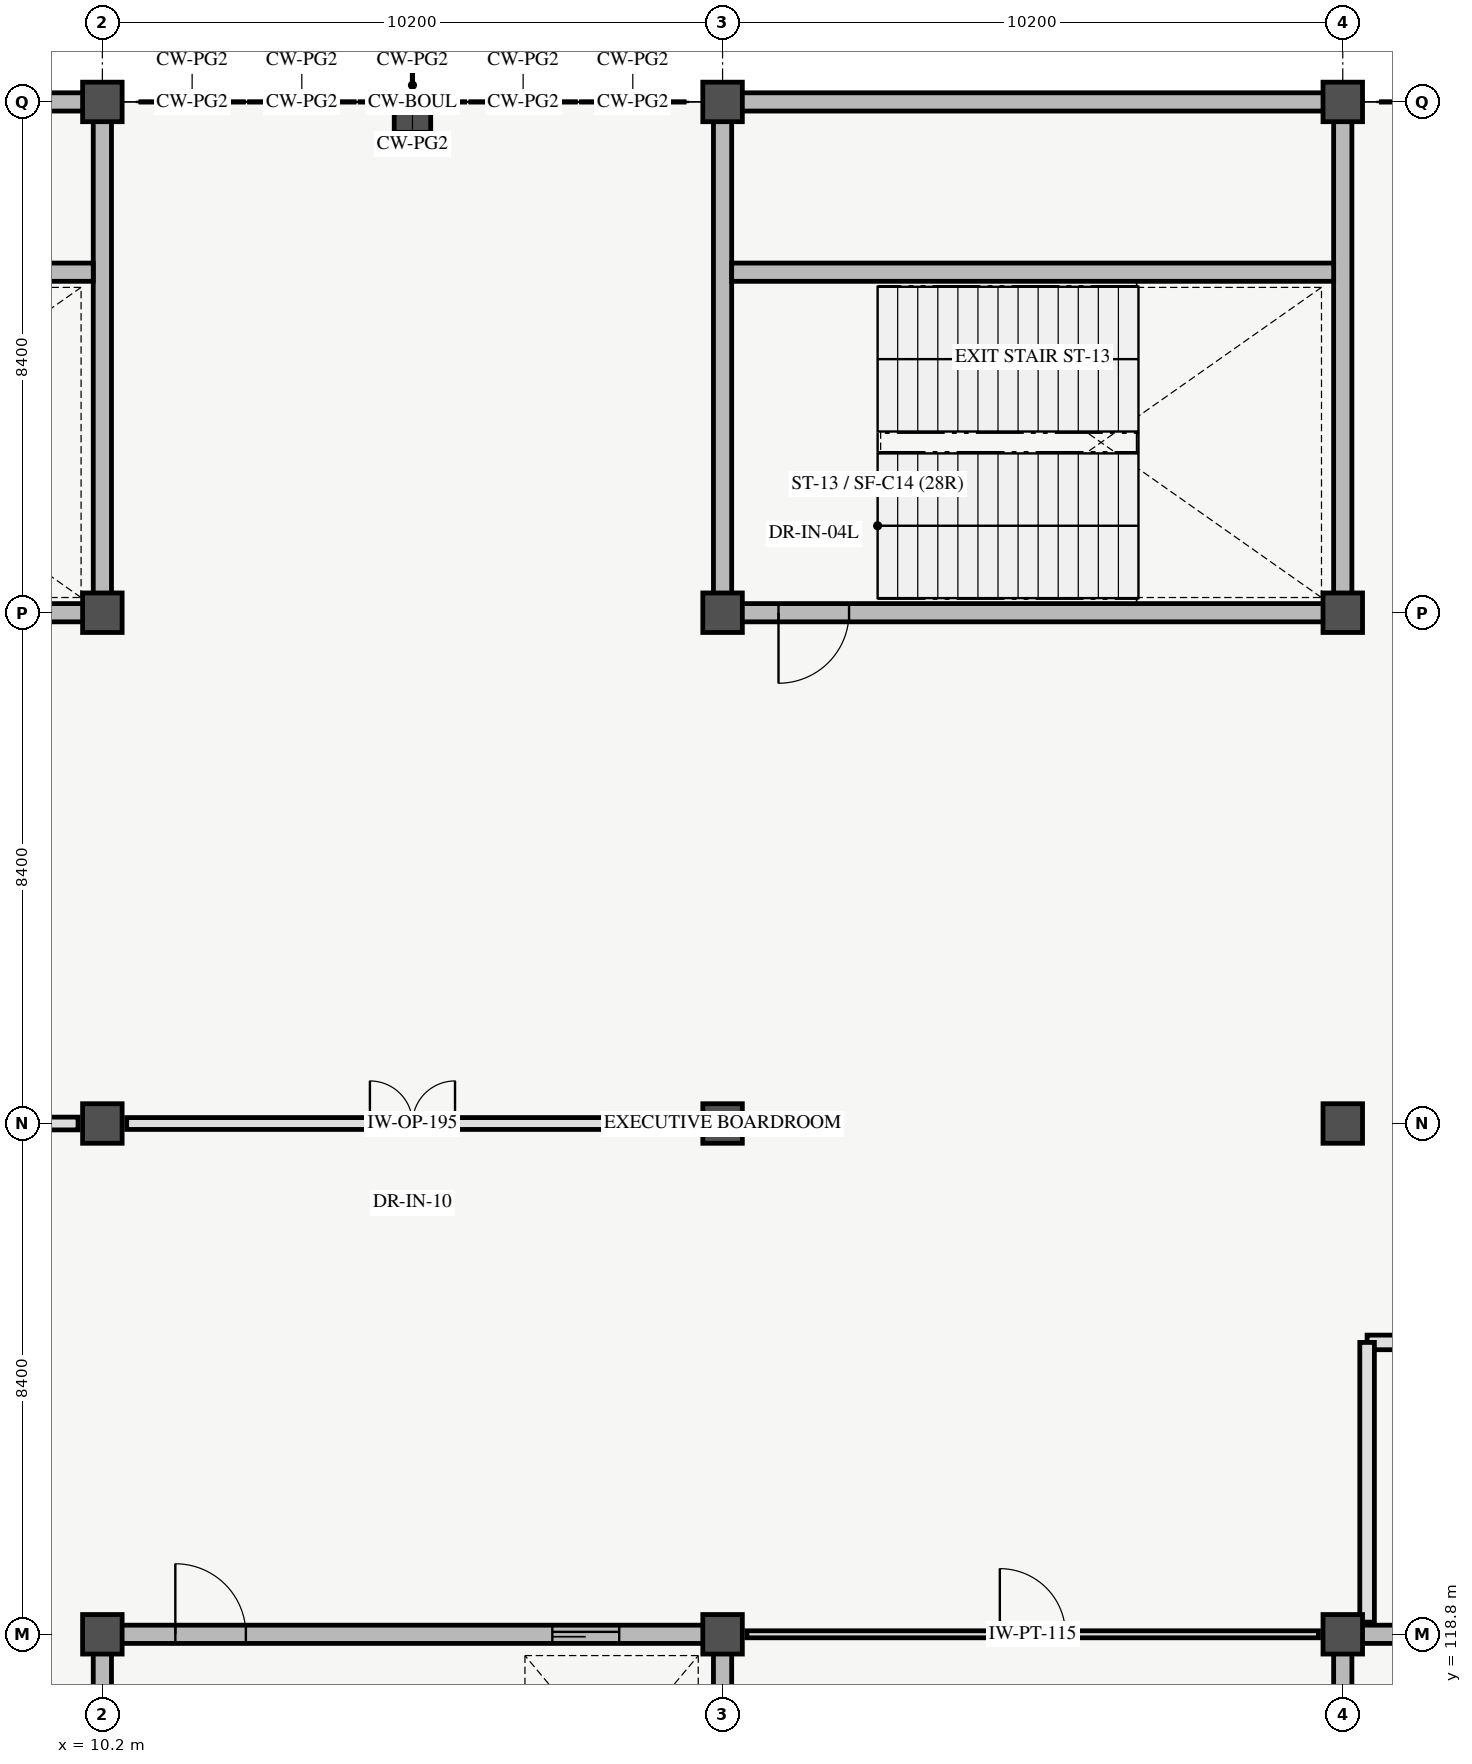
"""IFC4 building model, lengths in metres.
Left out: names, types, materials, properties, quantities, classifications, styles, units other than length and angle.
Written with IfcOpenShell. Run it as: python <this file> out.ifc"""

import sys

from ifc_helpers import new_model, si_unit, direction, frame, frame_2d, origin, origin_2d, place, context, subcontext, project, spatial, rectangle, extrude, element, fill, save


model = new_model("IFC4")
c1 = context("Model", 3, precision=1e-05, world=origin(), true_north=direction((0.0, 1.0)))
c2 = subcontext(c1, "Body", "Model", "MODEL_VIEW")
j1 = project(units=[si_unit("LENGTHUNIT", "METRE"), si_unit("PLANEANGLEUNIT", "RADIAN")], contexts=[c1])
p1 = place(None, origin())
s1 = spatial("IfcSite", under=j1, at=p1, CompositionType="ELEMENT")
p2 = place(p1, origin())
s2 = spatial("IfcBuilding", under=s1, at=p2, CompositionType="ELEMENT")
p3 = place(p2, frame((0.0, 0.0, 15.0)))
s3 = spatial("IfcBuildingStorey", under=s2, at=p3, CompositionType="ELEMENT", Elevation=15.0)
for number, where, z_axis, x_axis in (
    (1, (10.2, 118.8, 0.0), (0.0, 0.0, 1.0), (1.0, 0.0, 0.0)),
    (2, (10.2, 127.2, 0.0), (0.0, 0.0, 1.0), (1.0, 0.0, 0.0)),
    (3, (10.2, 135.6, 0.0), (0.0, 0.0, 1.0), (1.0, 0.0, 0.0)),
    (4, (10.2, 144.0, 0.0), (0.0, 0.0, 1.0), (1.0, 0.0, 0.0)),
    (5, (20.4, 118.8, 0.0), (0.0, 0.0, 1.0), (1.0, 0.0, 0.0)),
    (6, (20.4, 127.2, 0.0), (0.0, 0.0, 1.0), (1.0, 0.0, 0.0)),
    (7, (20.4, 135.6, 0.0), (0.0, 0.0, 1.0), (1.0, 0.0, 0.0)),
    (8, (20.4, 144.0, 0.0), (0.0, 0.0, 1.0), (1.0, 0.0, 0.0)),
    (9, (30.6, 118.8, 0.0), (0.0, 0.0, 1.0), (1.0, 0.0, 0.0)),
    (10, (30.6, 127.2, 0.0), (0.0, 0.0, 1.0), (1.0, 0.0, 0.0)),
    (11, (30.6, 135.6, 0.0), (0.0, 0.0, 1.0), (1.0, 0.0, 0.0)),
    (12, (30.6, 144.0, 0.0), (0.0, 0.0, 1.0), (1.0, 0.0, 0.0)),
):
    element("IfcColumn", number, at=place(p3, frame(where, z_axis=z_axis, x_axis=x_axis)), inside=s3, PredefinedType="COLUMN", context=c2, shape_type="SweptSolid", body=[
        extrude(rectangle(XDim=0.65, YDim=0.65, at=origin_2d()), origin(), (0.0, 0.0, 1.0), 4.2),
    ])
p4 = place(p3, frame((15.3, 143.7, 0.0), z_axis=(0.0, 0.0, 1.0), x_axis=(1.0, 0.0, 0.0)))
e13 = element("IfcColumn", 13, at=p4, inside=s3, PredefinedType="PILASTER", context=c2, shape_type="SweptSolid", body=[
    extrude(rectangle(XDim=0.6, YDim=0.4, at=origin_2d()), origin(), (0.0, 0.0, 1.0), 4.2),
])
p5 = place(p3, frame((10.2, 118.8, 0.0), z_axis=(0.0, 0.0, 1.0), x_axis=(1.0, 0.0, 0.0)))
e14 = element("IfcWall", 14, at=p5, inside=s3, PredefinedType="SHEAR", context=c2, shape_type="SweptSolid", body=[
    extrude(rectangle(XDim=10.2, YDim=0.3, at=frame_2d((5.1, 0.0))), origin(), (0.0, 0.0, 1.0), 4.2),
])
p6 = place(p5, frame((1.2, 0.0, 0.0)))
e15 = element("IfcOpeningElement", 15, at=p6, cuts=e14, PredefinedType="OPENING", context=c2, shape_type="SweptSolid", body=[
    extrude(rectangle(XDim=1.16, YDim=2.2, at=frame_2d((0.58, 1.1))), frame((0.0, 0.16, 0.0), z_axis=(0.0, -1.0, 0.0), x_axis=(1.0, 0.0, 0.0)), (0.0, 0.0, 1.0), 0.32),
])
p7 = place(p5, frame((7.4, 0.0, 0.0)))
e16 = element("IfcOpeningElement", 16, at=p7, cuts=e14, PredefinedType="OPENING", context=c2, shape_type="SweptSolid", body=[
    extrude(rectangle(XDim=1.1, YDim=2.2, at=frame_2d((0.55, 1.1))), frame((0.0, 0.16, 0.0), z_axis=(0.0, -1.0, 0.0), x_axis=(1.0, 0.0, 0.0)), (0.0, 0.0, 1.0), 0.32),
])
for number, where, z_axis, x_axis in (
    (17, (10.2, 109.2, 0.0), (0.0, 0.0, 1.0), (0.0, 1.0, 0.0)),
    (18, (20.4, 109.2, 0.0), (0.0, 0.0, 1.0), (0.0, 1.0, 0.0)),
):
    element("IfcWall", number, at=place(p3, frame(where, z_axis=z_axis, x_axis=x_axis)), inside=s3, PredefinedType="SHEAR", context=c2, shape_type="SweptSolid", body=[
        extrude(rectangle(XDim=9.6, YDim=0.3, at=frame_2d((4.8, 0.0))), origin(), (0.0, 0.0, 1.0), 4.2),
    ])
p8 = place(p3, frame((30.6, 118.8, 0.0), z_axis=(0.0, 0.0, 1.0), x_axis=(1.0, 0.0, 0.0)))
e19 = element("IfcWall", 19, at=p8, inside=s3, PredefinedType="SHEAR", context=c2, shape_type="SweptSolid", body=[
    extrude(rectangle(XDim=10.2, YDim=0.3, at=frame_2d((5.1, 0.0))), origin(), (0.0, 0.0, 1.0), 4.2),
])
p9 = place(p8, frame((1.2, 0.0, 0.0)))
e20 = element("IfcOpeningElement", 20, at=p9, cuts=e19, PredefinedType="OPENING", context=c2, shape_type="SweptSolid", body=[
    extrude(rectangle(XDim=1.16, YDim=2.2, at=frame_2d((0.58, 1.1))), frame((0.0, 0.16, 0.0), z_axis=(0.0, -1.0, 0.0), x_axis=(1.0, 0.0, 0.0)), (0.0, 0.0, 1.0), 0.32),
])
p10 = place(p8, frame((7.4, 0.0, 0.0)))
e21 = element("IfcOpeningElement", 21, at=p10, cuts=e19, PredefinedType="OPENING", context=c2, shape_type="SweptSolid", body=[
    extrude(rectangle(XDim=1.2, YDim=2.25, at=frame_2d((0.6, 1.125))), frame((0.0, 0.16, 0.0), z_axis=(0.0, -1.0, 0.0), x_axis=(1.0, 0.0, 0.0)), (0.0, 0.0, 1.0), 0.32),
])
p11 = place(p3, frame((30.6, 109.2, 0.0), z_axis=(0.0, 0.0, 1.0), x_axis=(0.0, 1.0, 0.0)))
e22 = element("IfcWall", 22, at=p11, inside=s3, PredefinedType="SHEAR", context=c2, shape_type="SweptSolid", body=[
    extrude(rectangle(XDim=9.6, YDim=0.3, at=frame_2d((4.8, 0.0))), origin(), (0.0, 0.0, 1.0), 4.2),
])
p12 = place(p3, frame((20.4, 135.6, 0.0), z_axis=(0.0, 0.0, 1.0), x_axis=(1.0, 0.0, 0.0)))
e23 = element("IfcWall", 23, at=p12, inside=s3, PredefinedType="SHEAR", context=c2, shape_type="SweptSolid", body=[
    extrude(rectangle(XDim=10.2, YDim=0.3, at=frame_2d((5.1, 0.0))), origin(), (0.0, 0.0, 1.0), 4.2),
])
p13 = place(p12, frame((0.92, 0.0, 0.0)))
e24 = element("IfcOpeningElement", 24, at=p13, cuts=e23, PredefinedType="OPENING", context=c2, shape_type="SweptSolid", body=[
    extrude(rectangle(XDim=1.16, YDim=2.2, at=frame_2d((0.58, 1.1))), frame((0.0, 0.16, 0.0), z_axis=(0.0, -1.0, 0.0), x_axis=(1.0, 0.0, 0.0)), (0.0, 0.0, 1.0), 0.32),
])
p14 = place(p3, frame((20.4, 144.0, 0.0), z_axis=(0.0, 0.0, 1.0), x_axis=(1.0, 0.0, 0.0)))
e25 = element("IfcWall", 25, at=p14, inside=s3, PredefinedType="SHEAR", context=c2, shape_type="SweptSolid", body=[
    extrude(rectangle(XDim=10.2, YDim=0.3, at=frame_2d((5.1, 0.0))), origin(), (0.0, 0.0, 1.0), 4.2),
])
for number, where, z_axis, x_axis in (
    (26, (20.4, 135.6, 0.0), (0.0, 0.0, 1.0), (0.0, 1.0, 0.0)),
    (27, (30.6, 135.6, 0.0), (0.0, 0.0, 1.0), (0.0, 1.0, 0.0)),
):
    element("IfcWall", number, at=place(p3, frame(where, z_axis=z_axis, x_axis=x_axis)), inside=s3, PredefinedType="SHEAR", context=c2, shape_type="SweptSolid", body=[
        extrude(rectangle(XDim=8.4, YDim=0.3, at=frame_2d((4.2, 0.0))), origin(), (0.0, 0.0, 1.0), 4.2),
    ])
p15 = place(p3, frame((20.55, 141.2, 0.0), z_axis=(0.0, 0.0, 1.0), x_axis=(1.0, 0.0, 0.0)))
e28 = element("IfcWall", 28, at=p15, inside=s3, PredefinedType="SHEAR", context=c2, shape_type="SweptSolid", body=[
    extrude(rectangle(XDim=9.9, YDim=0.3, at=frame_2d((4.95, 0.0))), origin(), (0.0, 0.0, 1.0), 4.2),
])
p16 = place(p3, frame((0.0, 135.6, 0.0), z_axis=(0.0, 0.0, 1.0), x_axis=(1.0, 0.0, 0.0)))
e29 = element("IfcWall", 29, at=p16, inside=s3, PredefinedType="SHEAR", context=c2, shape_type="SweptSolid", body=[
    extrude(rectangle(XDim=10.2, YDim=0.3, at=frame_2d((5.1, 0.0))), origin(), (0.0, 0.0, 1.0), 4.2),
])
p17 = place(p16, frame((0.92, 0.0, 0.0)))
e30 = element("IfcOpeningElement", 30, at=p17, cuts=e29, PredefinedType="OPENING", context=c2, shape_type="SweptSolid", body=[
    extrude(rectangle(XDim=1.16, YDim=2.2, at=frame_2d((0.58, 1.1))), frame((0.0, 0.16, 0.0), z_axis=(0.0, -1.0, 0.0), x_axis=(1.0, 0.0, 0.0)), (0.0, 0.0, 1.0), 0.32),
])
p18 = place(p3, frame((0.0, 144.0, 0.0), z_axis=(0.0, 0.0, 1.0), x_axis=(1.0, 0.0, 0.0)))
e31 = element("IfcWall", 31, at=p18, inside=s3, PredefinedType="SHEAR", context=c2, shape_type="SweptSolid", body=[
    extrude(rectangle(XDim=10.2, YDim=0.3, at=frame_2d((5.1, 0.0))), origin(), (0.0, 0.0, 1.0), 4.2),
])
p19 = place(p3, frame((10.2, 135.6, 0.0), z_axis=(0.0, 0.0, 1.0), x_axis=(0.0, 1.0, 0.0)))
e32 = element("IfcWall", 32, at=p19, inside=s3, PredefinedType="SHEAR", context=c2, shape_type="SweptSolid", body=[
    extrude(rectangle(XDim=8.4, YDim=0.3, at=frame_2d((4.2, 0.0))), origin(), (0.0, 0.0, 1.0), 4.2),
])
p20 = place(p3, frame((0.15, 141.2, 0.0), z_axis=(0.0, 0.0, 1.0), x_axis=(1.0, 0.0, 0.0)))
e33 = element("IfcWall", 33, at=p20, inside=s3, PredefinedType="SHEAR", context=c2, shape_type="SweptSolid", body=[
    extrude(rectangle(XDim=9.9, YDim=0.3, at=frame_2d((4.95, 0.0))), origin(), (0.0, 0.0, 1.0), 4.2),
])
p21 = place(p3, frame((31.0, 123.6, 0.0), z_axis=(0.0, 0.0, 1.0), x_axis=(1.0, 0.0, 0.0)))
e34 = element("IfcWall", 34, at=p21, inside=s3, PredefinedType="PARTITIONING", context=c2, shape_type="SweptSolid", body=[
    extrude(rectangle(XDim=9.4, YDim=0.24, at=frame_2d((4.7, 0.0))), origin(), (0.0, 0.0, 1.0), 3.06),
])
p22 = place(p21, frame((3.75, 0.0, 0.0)))
e35 = element("IfcOpeningElement", 35, at=p22, cuts=e34, PredefinedType="OPENING", context=c2, shape_type="SweptSolid", body=[
    extrude(rectangle(XDim=1.9, YDim=2.25, at=frame_2d((0.95, 1.125))), frame((0.0, 0.13, 0.0), z_axis=(0.0, -1.0, 0.0), x_axis=(1.0, 0.0, 0.0)), (0.0, 0.0, 1.0), 0.26),
])
p23 = place(p3, frame((31.0, 119.0, 0.0), z_axis=(0.0, 0.0, 1.0), x_axis=(0.0, 1.0, 0.0)))
e36 = element("IfcWall", 36, at=p23, inside=s3, PredefinedType="PARTITIONING", context=c2, shape_type="SweptSolid", body=[
    extrude(rectangle(XDim=4.6, YDim=0.24, at=frame_2d((2.3, 0.0))), origin(), (0.0, 0.0, 1.0), 3.06),
])
p24 = place(p3, frame((0.4, 127.2, 0.0), z_axis=(0.0, 0.0, 1.0), x_axis=(1.0, 0.0, 0.0)))
e37 = element("IfcWall", 37, at=p24, inside=s3, PredefinedType="MOVABLE", context=c2, shape_type="SweptSolid", body=[
    extrude(rectangle(XDim=9.4, YDim=0.21, at=frame_2d((4.7, 0.0))), origin(), (0.0, 0.0, 1.0), 3.06),
])
p25 = place(p24, frame((3.4, 0.0, 0.0)))
e38 = element("IfcOpeningElement", 38, at=p25, cuts=e37, PredefinedType="OPENING", context=c2, shape_type="SweptSolid", body=[
    extrude(rectangle(XDim=2.6, YDim=2.4, at=frame_2d((1.3, 1.2))), frame((0.0, 0.115, 0.0), z_axis=(0.0, -1.0, 0.0), x_axis=(1.0, 0.0, 0.0)), (0.0, 0.0, 1.0), 0.23),
])
p26 = place(p3, frame((10.6, 127.2, 0.0), z_axis=(0.0, 0.0, 1.0), x_axis=(1.0, 0.0, 0.0)))
e39 = element("IfcWall", 39, at=p26, inside=s3, PredefinedType="MOVABLE", context=c2, shape_type="SweptSolid", body=[
    extrude(rectangle(XDim=9.4, YDim=0.195, at=frame_2d((4.7, 0.0))), origin(), (0.0, 0.0, 1.0), 3.06),
])
p27 = place(p26, frame((4.0, 0.0, 0.0)))
e40 = element("IfcOpeningElement", 40, at=p27, cuts=e39, PredefinedType="OPENING", context=c2, shape_type="SweptSolid", body=[
    extrude(rectangle(XDim=1.4, YDim=2.2, at=frame_2d((0.7, 1.1))), frame((0.0, 0.107, 0.0), z_axis=(0.0, -1.0, 0.0), x_axis=(1.0, 0.0, 0.0)), (0.0, 0.0, 1.0), 0.215),
])
p28 = place(p3, frame((20.8, 118.8, 0.0), z_axis=(0.0, 0.0, 1.0), x_axis=(1.0, 0.0, 0.0)))
e41 = element("IfcWall", 41, at=p28, inside=s3, PredefinedType="PARTITIONING", context=c2, shape_type="SweptSolid", body=[
    extrude(rectangle(XDim=9.4, YDim=0.115, at=frame_2d((4.7, 0.0))), origin(), (0.0, 0.0, 1.0), 3.06),
])
p29 = place(p28, frame((4.16, 0.0, 0.0)))
e42 = element("IfcOpeningElement", 42, at=p29, cuts=e41, PredefinedType="OPENING", context=c2, shape_type="SweptSolid", body=[
    extrude(rectangle(XDim=1.08, YDim=2.18, at=frame_2d((0.54, 1.09))), frame((0.0, 0.067, 0.0), z_axis=(0.0, -1.0, 0.0), x_axis=(1.0, 0.0, 0.0)), (0.0, 0.0, 1.0), 0.135),
])
p30 = place(p6, origin())
e43 = element("IfcDoor", 43, at=p30, inside=s3, OperationType="SINGLE_SWING_LEFT", PredefinedType="DOOR", context=c2, shape_type="SweptSolid", body=[
    extrude(rectangle(XDim=1.16, YDim=2.2, at=frame_2d((0.58, 1.1))), frame((0.0, 0.025, 0.0), z_axis=(0.0, -1.0, 0.0), x_axis=(1.0, 0.0, 0.0)), (0.0, 0.0, 1.0), 0.05),
])
fill(e15, e43)
p31 = place(p7, origin())
e44 = element("IfcDoor", 44, at=p31, inside=s3, OperationType="SLIDING_TO_RIGHT", PredefinedType="DOOR", context=c2, shape_type="SweptSolid", body=[
    extrude(rectangle(XDim=1.1, YDim=2.2, at=frame_2d((0.55, 1.1))), frame((0.0, 0.025, 0.0), z_axis=(0.0, -1.0, 0.0), x_axis=(1.0, 0.0, 0.0)), (0.0, 0.0, 1.0), 0.05),
])
fill(e16, e44)
p32 = place(p13, origin())
e45 = element("IfcDoor", 45, at=p32, inside=s3, OperationType="SINGLE_SWING_LEFT", PredefinedType="DOOR", context=c2, shape_type="SweptSolid", body=[
    extrude(rectangle(XDim=1.16, YDim=2.2, at=frame_2d((0.58, 1.1))), frame((0.0, 0.025, 0.0), z_axis=(0.0, -1.0, 0.0), x_axis=(1.0, 0.0, 0.0)), (0.0, 0.0, 1.0), 0.05),
])
fill(e24, e45)
p33 = place(p27, origin())
e46 = element("IfcDoor", 46, at=p33, inside=s3, OperationType="DOUBLE_DOOR_SINGLE_SWING", PredefinedType="DOOR", context=c2, shape_type="SweptSolid", body=[
    extrude(rectangle(XDim=1.4, YDim=2.2, at=frame_2d((0.7, 1.1))), frame((0.0, 0.025, 0.0), z_axis=(0.0, -1.0, 0.0), x_axis=(1.0, 0.0, 0.0)), (0.0, 0.0, 1.0), 0.05),
])
fill(e40, e46)
p34 = place(p29, origin())
e47 = element("IfcDoor", 47, at=p34, inside=s3, OperationType="SINGLE_SWING_LEFT", PredefinedType="DOOR", context=c2, shape_type="SweptSolid", body=[
    extrude(rectangle(XDim=1.08, YDim=2.18, at=frame_2d((0.54, 1.09))), frame((0.0, 0.025, 0.0), z_axis=(0.0, -1.0, 0.0), x_axis=(1.0, 0.0, 0.0)), (0.0, 0.0, 1.0), 0.05),
])
fill(e42, e47)
save(model, sys.argv[1])
